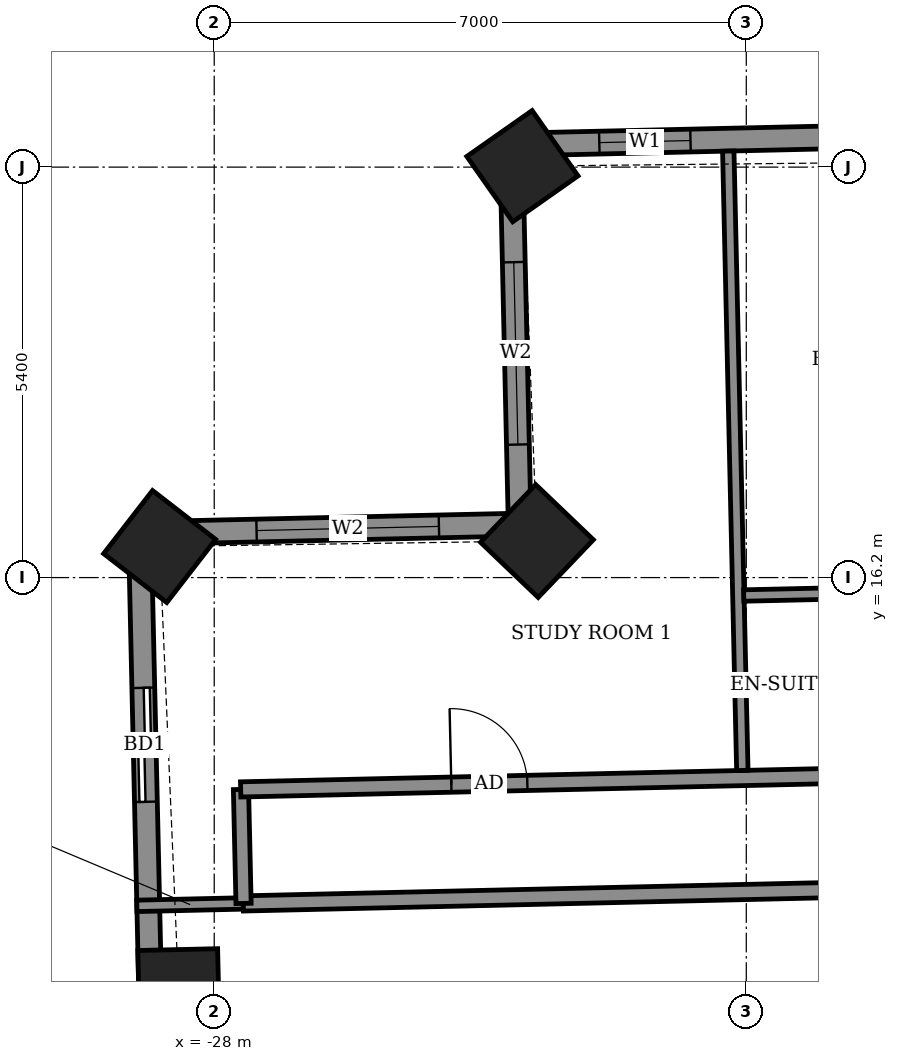
"""IFC4 building model, lengths in metres.
Left out: names, types, materials, properties, quantities, classifications, styles, units other than length and angle.
Written with IfcOpenShell. Run it as: python <this file> out.ifc"""

import sys

from ifc_helpers import new_model, si_unit, direction, frame, frame_2d, origin, origin_2d, place, context, subcontext, project, spatial, rectangle, extrude, element, fill, save


model = new_model("IFC4")
c1 = context("Model", 3, precision=1e-05, world=origin(), true_north=direction((0.0, 1.0)))
c2 = subcontext(c1, "Body", "Model", "MODEL_VIEW")
j1 = project(units=[si_unit("LENGTHUNIT", "METRE"), si_unit("PLANEANGLEUNIT", "RADIAN")], contexts=[c1])
p1 = place(None, origin())
s1 = spatial("IfcSite", under=j1, at=p1, CompositionType="ELEMENT")
p2 = place(p1, origin())
s2 = spatial("IfcBuilding", under=s1, at=p2, CompositionType="ELEMENT")
p3 = place(p2, frame((0.0, 0.0, 245.5)))
s3 = spatial("IfcBuildingStorey", under=s2, at=p3, CompositionType="ELEMENT", Elevation=245.5)
for number, where, z_axis, x_axis in (
    (1, (-23.945, 21.613, -0.55), (0.0, 0.0, 1.0), (-0.818, -0.575, 0.0)),
    (2, (-23.754, 16.681, -0.55), (0.0, 0.0, 1.0), (-0.691, -0.723, 0.0)),
    (3, (-28.718, 16.609, -0.55), (0.0, 0.0, 1.0), (-0.612, -0.791, 0.0)),
    (4, (-28.468, 10.781, -0.55), (0.0, 0.0, 1.0), (0.023, -1.0, 0.0)),
):
    element("IfcColumn", number, at=place(p3, frame(where, z_axis=z_axis, x_axis=x_axis)), inside=s3, PredefinedType="COLUMN", context=c2, shape_type="SweptSolid", body=[
        extrude(rectangle(XDim=1.05, YDim=1.05, at=origin_2d()), origin(), (0.0, 0.0, 1.0), 3.6),
    ])
p4 = place(p3, frame((20.403, 22.905, 0.0), z_axis=(0.0, 0.0, 1.0), x_axis=(-0.99974298964, -0.022670568288, 0.0)))
e5 = element("IfcWall", 5, at=p4, inside=s3, PredefinedType="SOLIDWALL", context=c2, shape_type="SweptSolid", body=[
    extrude(rectangle(XDim=44.509, YDim=0.3, at=frame_2d((22.254, 0.0))), origin(), (0.0, 0.0, 1.0), 2.5),
])
p5 = place(p4, frame((1.272, 0.0, 0.0)))
e6 = element("IfcOpeningElement", 6, at=p5, cuts=e5, PredefinedType="OPENING", context=c2, shape_type="SweptSolid", body=[
    extrude(rectangle(XDim=1.5, YDim=2.4, at=frame_2d((0.75, 1.2))), frame((0.0, 0.16, 0.0), z_axis=(0.0, -1.0, 0.0), x_axis=(1.0, 0.0, 0.0)), (0.0, 0.0, 1.0), 0.32),
])
p6 = place(p4, frame((4.501, 0.0, 0.0)))
e7 = element("IfcOpeningElement", 7, at=p6, cuts=e5, PredefinedType="OPENING", context=c2, shape_type="SweptSolid", body=[
    extrude(rectangle(XDim=1.5, YDim=2.4, at=frame_2d((0.75, 1.2))), frame((0.0, 0.16, 0.0), z_axis=(0.0, -1.0, 0.0), x_axis=(1.0, 0.0, 0.0)), (0.0, 0.0, 1.0), 0.32),
])
p7 = place(p4, frame((9.058, 0.0, 0.0)))
e8 = element("IfcOpeningElement", 8, at=p7, cuts=e5, PredefinedType="OPENING", context=c2, shape_type="SweptSolid", body=[
    extrude(rectangle(XDim=1.5, YDim=2.4, at=frame_2d((0.75, 1.2))), frame((0.0, 0.16, 0.0), z_axis=(0.0, -1.0, 0.0), x_axis=(1.0, 0.0, 0.0)), (0.0, 0.0, 1.0), 0.32),
])
p8 = place(p4, frame((12.46, 0.0, 0.0)))
e9 = element("IfcOpeningElement", 9, at=p8, cuts=e5, PredefinedType="OPENING", context=c2, shape_type="SweptSolid", body=[
    extrude(rectangle(XDim=1.5, YDim=2.4, at=frame_2d((0.75, 1.2))), frame((0.0, 0.16, 0.0), z_axis=(0.0, -1.0, 0.0), x_axis=(1.0, 0.0, 0.0)), (0.0, 0.0, 1.0), 0.32),
])
p9 = place(p4, frame((17.533, 0.0, 0.0)))
e10 = element("IfcOpeningElement", 10, at=p9, cuts=e5, PredefinedType="OPENING", context=c2, shape_type="SweptSolid", body=[
    extrude(rectangle(XDim=1.5, YDim=2.4, at=frame_2d((0.75, 1.2))), frame((0.0, 0.16, 0.0), z_axis=(0.0, -1.0, 0.0), x_axis=(1.0, 0.0, 0.0)), (0.0, 0.0, 1.0), 0.32),
])
p10 = place(p4, frame((22.993, 0.0, 0.0)))
e11 = element("IfcOpeningElement", 11, at=p10, cuts=e5, PredefinedType="OPENING", context=c2, shape_type="SweptSolid", body=[
    extrude(rectangle(XDim=1.2, YDim=2.4, at=frame_2d((0.6, 1.2))), frame((0.0, 0.16, 0.0), z_axis=(0.0, -1.0, 0.0), x_axis=(1.0, 0.0, 0.0)), (0.0, 0.0, 1.0), 0.32),
])
p11 = place(p4, frame((26.033, 0.0, 0.0)))
e12 = element("IfcOpeningElement", 12, at=p11, cuts=e5, PredefinedType="OPENING", context=c2, shape_type="SweptSolid", body=[
    extrude(rectangle(XDim=1.5, YDim=2.4, at=frame_2d((0.75, 1.2))), frame((0.0, 0.16, 0.0), z_axis=(0.0, -1.0, 0.0), x_axis=(1.0, 0.0, 0.0)), (0.0, 0.0, 1.0), 0.32),
])
p12 = place(p4, frame((30.827, 0.0, 0.0)))
e13 = element("IfcOpeningElement", 13, at=p12, cuts=e5, PredefinedType="OPENING", context=c2, shape_type="SweptSolid", body=[
    extrude(rectangle(XDim=1.5, YDim=2.4, at=frame_2d((0.75, 1.2))), frame((0.0, 0.16, 0.0), z_axis=(0.0, -1.0, 0.0), x_axis=(1.0, 0.0, 0.0)), (0.0, 0.0, 1.0), 0.32),
])
p13 = place(p4, frame((34.286, 0.0, 0.0)))
e14 = element("IfcOpeningElement", 14, at=p13, cuts=e5, PredefinedType="OPENING", context=c2, shape_type="SweptSolid", body=[
    extrude(rectangle(XDim=1.5, YDim=2.4, at=frame_2d((0.75, 1.2))), frame((0.0, 0.16, 0.0), z_axis=(0.0, -1.0, 0.0), x_axis=(1.0, 0.0, 0.0)), (0.0, 0.0, 1.0), 0.32),
])
p14 = place(p4, frame((38.811, 0.0, 0.0)))
e15 = element("IfcOpeningElement", 15, at=p14, cuts=e5, PredefinedType="OPENING", context=c2, shape_type="SweptSolid", body=[
    extrude(rectangle(XDim=1.5, YDim=2.4, at=frame_2d((0.75, 1.2))), frame((0.0, 0.16, 0.0), z_axis=(0.0, -1.0, 0.0), x_axis=(1.0, 0.0, 0.0)), (0.0, 0.0, 1.0), 0.32),
])
p15 = place(p4, frame((42.148, 0.0, 0.9)))
e16 = element("IfcOpeningElement", 16, at=p15, cuts=e5, PredefinedType="OPENING", context=c2, shape_type="SweptSolid", body=[
    extrude(rectangle(XDim=1.2, YDim=1.5, at=frame_2d((0.6, 0.75))), frame((0.0, 0.16, 0.0), z_axis=(0.0, -1.0, 0.0), x_axis=(1.0, 0.0, 0.0)), (0.0, 0.0, 1.0), 0.32),
])
p16 = place(p3, frame((-24.094, 21.896, 0.0), z_axis=(0.0, 0.0, 1.0), x_axis=(0.022606059803, -0.999744450377, 0.0)))
e17 = element("IfcWall", 17, at=p16, inside=s3, PredefinedType="SOLIDWALL", context=c2, shape_type="SweptSolid", body=[
    extrude(rectangle(XDim=5.0, YDim=0.3, at=frame_2d((2.5, 0.0))), origin(), (0.0, 0.0, 1.0), 2.55),
])
p17 = place(p16, frame((1.547, 0.0, 0.9)))
e18 = element("IfcOpeningElement", 18, at=p17, cuts=e17, PredefinedType="OPENING", context=c2, shape_type="SweptSolid", body=[
    extrude(rectangle(XDim=2.4, YDim=1.5, at=frame_2d((1.2, 0.75))), frame((0.0, 0.16, 0.0), z_axis=(0.0, -1.0, 0.0), x_axis=(1.0, 0.0, 0.0)), (0.0, 0.0, 1.0), 0.32),
])
p18 = place(p3, frame((-23.981, 16.897, 0.0), z_axis=(0.0, 0.0, 1.0), x_axis=(-0.999744350543, -0.022610474516, 0.0)))
e19 = element("IfcWall", 19, at=p18, inside=s3, PredefinedType="SOLIDWALL", context=c2, shape_type="SweptSolid", body=[
    extrude(rectangle(XDim=4.999, YDim=0.3, at=frame_2d((2.5, 0.0))), origin(), (0.0, 0.0, 1.0), 2.55),
])
p19 = place(p18, frame((1.063, 0.0, 0.9)))
e20 = element("IfcOpeningElement", 20, at=p19, cuts=e19, PredefinedType="OPENING", context=c2, shape_type="SweptSolid", body=[
    extrude(rectangle(XDim=2.4, YDim=1.5, at=frame_2d((1.2, 0.75))), frame((0.0, 0.16, 0.0), z_axis=(0.0, -1.0, 0.0), x_axis=(1.0, 0.0, 0.0)), (0.0, 0.0, 1.0), 0.32),
])
p20 = place(p3, frame((-28.979, 16.784, 0.0), z_axis=(0.0, 0.0, 1.0), x_axis=(0.022685159264, -0.999742658662, 0.0)))
e21 = element("IfcWall", 21, at=p20, inside=s3, PredefinedType="SOLIDWALL", context=c2, shape_type="SweptSolid", body=[
    extrude(rectangle(XDim=12.699, YDim=0.3, at=frame_2d((6.35, 0.0))), origin(), (0.0, 0.0, 1.0), 2.55),
])
p21 = place(p20, frame((2.035, 0.0, 0.0)))
e22 = element("IfcOpeningElement", 22, at=p21, cuts=e21, PredefinedType="OPENING", context=c2, shape_type="SweptSolid", body=[
    extrude(rectangle(XDim=1.5, YDim=2.4, at=frame_2d((0.75, 1.2))), frame((0.0, 0.16, 0.0), z_axis=(0.0, -1.0, 0.0), x_axis=(1.0, 0.0, 0.0)), (0.0, 0.0, 1.0), 0.32),
])
p22 = place(p20, frame((7.894, 0.0, 0.9)))
e23 = element("IfcOpeningElement", 23, at=p22, cuts=e21, PredefinedType="OPENING", context=c2, shape_type="SweptSolid", body=[
    extrude(rectangle(XDim=2.4, YDim=1.5, at=frame_2d((1.2, 0.75))), frame((0.0, 0.16, 0.0), z_axis=(0.0, -1.0, 0.0), x_axis=(1.0, 0.0, 0.0)), (0.0, 0.0, 1.0), 0.32),
])
p23 = place(p3, frame((-29.018, 11.881, 0.0), z_axis=(0.0, 0.0, 1.0), x_axis=(0.999740667531, 0.022772739949, 0.0)))
e24 = element("IfcWall", 24, at=p23, inside=s3, PredefinedType="PARTITIONING", context=c2, shape_type="SweptSolid", body=[
    extrude(rectangle(XDim=1.404, YDim=0.15, at=frame_2d((0.702, 0.0))), origin(), (0.0, 0.0, 1.0), 2.55),
])
p24 = place(p3, frame((-27.618, 11.913, 0.0), z_axis=(0.0, 0.0, 1.0), x_axis=(0.999741483035, 0.022736910479, 0.0)))
e25 = element("IfcWall", 25, at=p24, inside=s3, PredefinedType="PARTITIONING", context=c2, shape_type="SweptSolid", body=[
    extrude(rectangle(XDim=10.373, YDim=0.2, at=frame_2d((5.186, 0.0))), origin(), (0.0, 0.0, 1.0), 3.05),
])
p25 = place(p3, frame((-27.614, 11.913, 0.0), z_axis=(0.0, 0.0, 1.0), x_axis=(-0.022617910375, 0.999744182344, 0.0)))
e26 = element("IfcWall", 26, at=p25, inside=s3, PredefinedType="PARTITIONING", context=c2, shape_type="SweptSolid", body=[
    extrude(rectangle(XDim=1.5, YDim=0.2, at=frame_2d((0.75, 0.0))), origin(), (0.0, 0.0, 1.0), 3.05),
])
p26 = place(p3, frame((-27.652, 13.413, 0.0), z_axis=(0.0, 0.0, 1.0), x_axis=(0.999742864992, 0.022676064408, 0.0)))
e27 = element("IfcWall", 27, at=p26, inside=s3, PredefinedType="PARTITIONING", context=c2, shape_type="SweptSolid", body=[
    extrude(rectangle(XDim=50.882, YDim=0.2, at=frame_2d((25.441, 0.0))), origin(), (0.0, 0.0, 1.0), 3.05),
])
p27 = place(p26, frame((47.801, 0.0, 0.0)))
e28 = element("IfcOpeningElement", 28, at=p27, cuts=e27, PredefinedType="OPENING", context=c2, shape_type="SweptSolid", body=[
    extrude(rectangle(XDim=1.0, YDim=2.1, at=frame_2d((0.5, 1.05))), frame((0.0, 0.11, 0.0), z_axis=(0.0, -1.0, 0.0), x_axis=(1.0, 0.0, 0.0)), (0.0, 0.0, 1.0), 0.22),
])
p28 = place(p26, frame((43.425, 0.0, 0.0)))
e29 = element("IfcOpeningElement", 29, at=p28, cuts=e27, PredefinedType="OPENING", context=c2, shape_type="SweptSolid", body=[
    extrude(rectangle(XDim=0.9, YDim=2.1, at=frame_2d((0.45, 1.05))), frame((0.0, 0.11, 0.0), z_axis=(0.0, -1.0, 0.0), x_axis=(1.0, 0.0, 0.0)), (0.0, 0.0, 1.0), 0.22),
])
p29 = place(p26, frame((36.8, 0.0, 0.0)))
e30 = element("IfcOpeningElement", 30, at=p29, cuts=e27, PredefinedType="OPENING", context=c2, shape_type="SweptSolid", body=[
    extrude(rectangle(XDim=0.9, YDim=2.1, at=frame_2d((0.45, 1.05))), frame((0.0, 0.11, 0.0), z_axis=(0.0, -1.0, 0.0), x_axis=(1.0, 0.0, 0.0)), (0.0, 0.0, 1.0), 0.22),
])
p30 = place(p26, frame((34.975, 0.0, 0.0)))
e31 = element("IfcOpeningElement", 31, at=p30, cuts=e27, PredefinedType="OPENING", context=c2, shape_type="SweptSolid", body=[
    extrude(rectangle(XDim=0.9, YDim=2.1, at=frame_2d((0.45, 1.05))), frame((0.0, 0.11, 0.0), z_axis=(0.0, -1.0, 0.0), x_axis=(1.0, 0.0, 0.0)), (0.0, 0.0, 1.0), 0.22),
])
p31 = place(p26, frame((28.325, 0.0, 0.0)))
e32 = element("IfcOpeningElement", 32, at=p31, cuts=e27, PredefinedType="OPENING", context=c2, shape_type="SweptSolid", body=[
    extrude(rectangle(XDim=0.9, YDim=2.1, at=frame_2d((0.45, 1.05))), frame((0.0, 0.11, 0.0), z_axis=(0.0, -1.0, 0.0), x_axis=(1.0, 0.0, 0.0)), (0.0, 0.0, 1.0), 0.22),
])
p32 = place(p26, frame((26.475, 0.0, 0.0)))
e33 = element("IfcOpeningElement", 33, at=p32, cuts=e27, PredefinedType="OPENING", context=c2, shape_type="SweptSolid", body=[
    extrude(rectangle(XDim=0.9, YDim=2.1, at=frame_2d((0.45, 1.05))), frame((0.0, 0.11, 0.0), z_axis=(0.0, -1.0, 0.0), x_axis=(1.0, 0.0, 0.0)), (0.0, 0.0, 1.0), 0.22),
])
p33 = place(p26, frame((19.825, 0.0, 0.0)))
e34 = element("IfcOpeningElement", 34, at=p33, cuts=e27, PredefinedType="OPENING", context=c2, shape_type="SweptSolid", body=[
    extrude(rectangle(XDim=0.9, YDim=2.1, at=frame_2d((0.45, 1.05))), frame((0.0, 0.11, 0.0), z_axis=(0.0, -1.0, 0.0), x_axis=(1.0, 0.0, 0.0)), (0.0, 0.0, 1.0), 0.22),
])
p34 = place(p26, frame((17.975, 0.0, 0.0)))
e35 = element("IfcOpeningElement", 35, at=p34, cuts=e27, PredefinedType="OPENING", context=c2, shape_type="SweptSolid", body=[
    extrude(rectangle(XDim=0.9, YDim=2.1, at=frame_2d((0.45, 1.05))), frame((0.0, 0.11, 0.0), z_axis=(0.0, -1.0, 0.0), x_axis=(1.0, 0.0, 0.0)), (0.0, 0.0, 1.0), 0.22),
])
p35 = place(p26, frame((11.325, 0.0, 0.0)))
e36 = element("IfcOpeningElement", 36, at=p35, cuts=e27, PredefinedType="OPENING", context=c2, shape_type="SweptSolid", body=[
    extrude(rectangle(XDim=0.9, YDim=2.1, at=frame_2d((0.45, 1.05))), frame((0.0, 0.11, 0.0), z_axis=(0.0, -1.0, 0.0), x_axis=(1.0, 0.0, 0.0)), (0.0, 0.0, 1.0), 0.22),
])
p36 = place(p26, frame((9.475, 0.0, 0.0)))
e37 = element("IfcOpeningElement", 37, at=p36, cuts=e27, PredefinedType="OPENING", context=c2, shape_type="SweptSolid", body=[
    extrude(rectangle(XDim=0.9, YDim=2.1, at=frame_2d((0.45, 1.05))), frame((0.0, 0.11, 0.0), z_axis=(0.0, -1.0, 0.0), x_axis=(1.0, 0.0, 0.0)), (0.0, 0.0, 1.0), 0.22),
])
p37 = place(p26, frame((2.772, 0.0, 0.0)))
e38 = element("IfcOpeningElement", 38, at=p37, cuts=e27, PredefinedType="OPENING", context=c2, shape_type="SweptSolid", body=[
    extrude(rectangle(XDim=1.0, YDim=2.1, at=frame_2d((0.5, 1.05))), frame((0.0, 0.11, 0.0), z_axis=(0.0, -1.0, 0.0), x_axis=(1.0, 0.0, 0.0)), (0.0, 0.0, 1.0), 0.22),
])
p38 = place(p3, frame((-21.052, 13.663, 0.0), z_axis=(0.0, 0.0, 1.0), x_axis=(-0.022706435224, 0.999742175663, 0.0)))
e39 = element("IfcWall", 39, at=p38, inside=s3, PredefinedType="PARTITIONING", context=c2, shape_type="SweptSolid", body=[
    extrude(rectangle(XDim=8.15, YDim=0.15, at=frame_2d((4.075, 0.0))), origin(), (0.0, 0.0, 1.0), 2.5),
])
p39 = place(p3, frame((-21.034, 15.964, 0.0), z_axis=(0.0, 0.0, 1.0), x_axis=(0.999749954681, 0.022361308448, 0.0)))
e40 = element("IfcWall", 40, at=p39, inside=s3, PredefinedType="PARTITIONING", context=c2, shape_type="SweptSolid", body=[
    extrude(rectangle(XDim=2.325, YDim=0.15, at=frame_2d((1.163, 0.0))), origin(), (0.0, 0.0, 1.0), 3.05),
])
p40 = place(p15, origin())
e41 = element("IfcWindow", 41, at=p40, inside=s3, PartitioningType="SINGLE_PANEL", PredefinedType="WINDOW", context=c2, shape_type="SweptSolid", body=[
    extrude(rectangle(XDim=1.2, YDim=1.5, at=frame_2d((0.6, 0.75))), frame((0.0, 0.03, 0.0), z_axis=(0.0, -1.0, 0.0), x_axis=(1.0, 0.0, 0.0)), (0.0, 0.0, 1.0), 0.06),
])
fill(e16, e41)
p41 = place(p17, origin())
e42 = element("IfcWindow", 42, at=p41, inside=s3, PartitioningType="DOUBLE_PANEL_VERTICAL", PredefinedType="WINDOW", context=c2, shape_type="SweptSolid", body=[
    extrude(rectangle(XDim=2.4, YDim=1.5, at=frame_2d((1.2, 0.75))), frame((0.0, 0.03, 0.0), z_axis=(0.0, -1.0, 0.0), x_axis=(1.0, 0.0, 0.0)), (0.0, 0.0, 1.0), 0.06),
])
fill(e18, e42)
p42 = place(p19, origin())
e43 = element("IfcWindow", 43, at=p42, inside=s3, PartitioningType="DOUBLE_PANEL_VERTICAL", PredefinedType="WINDOW", context=c2, shape_type="SweptSolid", body=[
    extrude(rectangle(XDim=2.4, YDim=1.5, at=frame_2d((1.2, 0.75))), frame((0.0, 0.03, 0.0), z_axis=(0.0, -1.0, 0.0), x_axis=(1.0, 0.0, 0.0)), (0.0, 0.0, 1.0), 0.06),
])
fill(e20, e43)
p43 = place(p21, origin())
e44 = element("IfcDoor", 44, at=p43, inside=s3, OperationType="SLIDING_TO_LEFT", PredefinedType="DOOR", context=c2, shape_type="SweptSolid", body=[
    extrude(rectangle(XDim=1.5, YDim=2.4, at=frame_2d((0.75, 1.2))), frame((0.0, 0.025, 0.0), z_axis=(0.0, -1.0, 0.0), x_axis=(1.0, 0.0, 0.0)), (0.0, 0.0, 1.0), 0.05),
])
fill(e22, e44)
p44 = place(p37, origin())
e45 = element("IfcDoor", 45, at=p44, inside=s3, OperationType="SINGLE_SWING_RIGHT", PredefinedType="DOOR", context=c2, shape_type="SweptSolid", body=[
    extrude(rectangle(XDim=1.0, YDim=2.1, at=frame_2d((0.5, 1.05))), frame((0.0, 0.025, 0.0), z_axis=(0.0, -1.0, 0.0), x_axis=(1.0, 0.0, 0.0)), (0.0, 0.0, 1.0), 0.05),
])
fill(e38, e45)
save(model, sys.argv[1])
